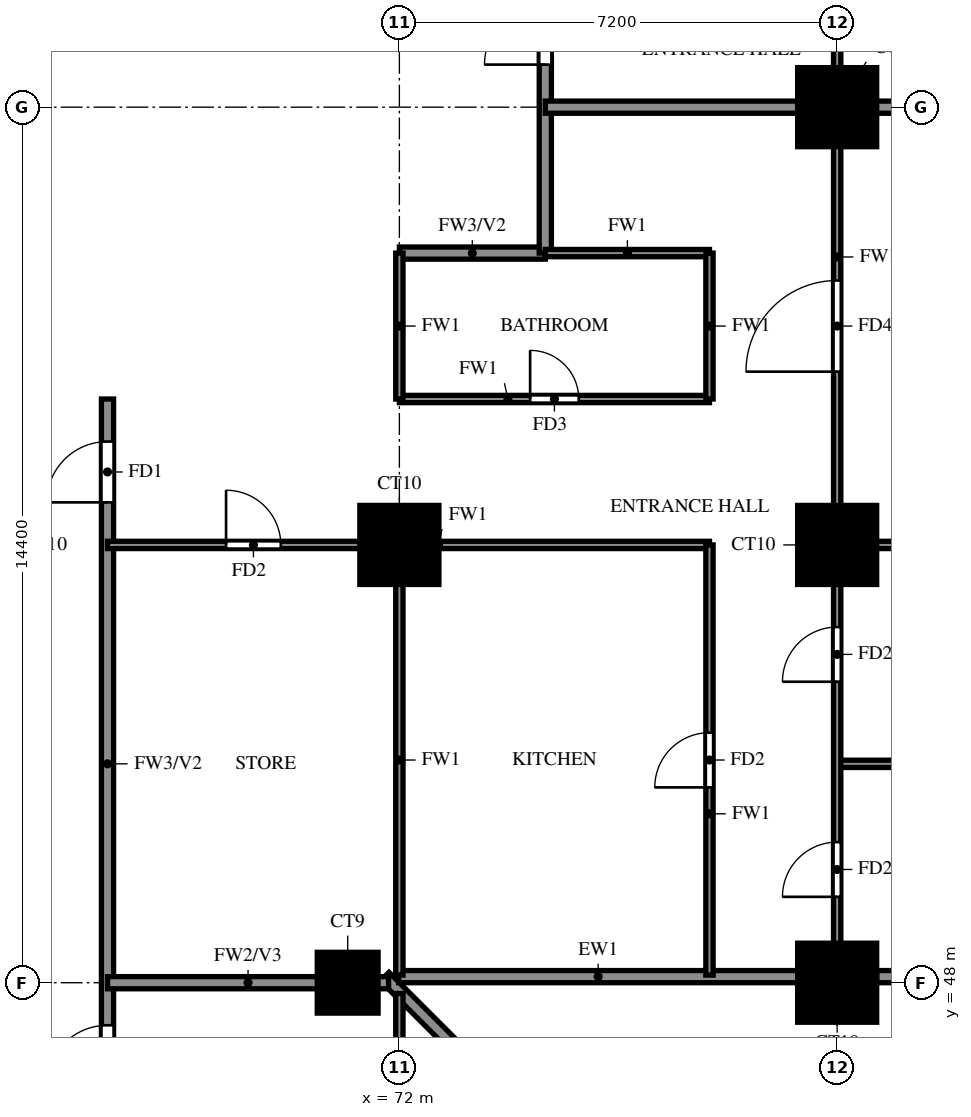
"""IFC4 building model, lengths in metres.
Left out: names, types, materials, properties, quantities, classifications, styles, units other than length and angle.
Written with IfcOpenShell. Run it as: python <this file> out.ifc"""

import sys

from ifc_helpers import new_model, si_unit, direction, frame, frame_2d, origin, origin_2d, place, context, subcontext, project, spatial, rectangle, extrude, source, transform, mapped, element, fill, save


model = new_model("IFC4")
c1 = context("Model", 3, precision=1e-05, world=origin(), true_north=direction((0.0, 1.0)))
c2 = subcontext(c1, "Body", "Model", "MODEL_VIEW")
j1 = project(units=[si_unit("LENGTHUNIT", "METRE"), si_unit("PLANEANGLEUNIT", "RADIAN")], contexts=[c1])
p1 = place(None, origin())
s1 = spatial("IfcSite", under=j1, at=p1, CompositionType="ELEMENT")
p2 = place(p1, origin())
s2 = spatial("IfcBuilding", under=s1, at=p2, CompositionType="ELEMENT")
p3 = place(p2, frame((0.0, 0.0, 62.0)))
s3 = spatial("IfcBuildingStorey", under=s2, at=p3, CompositionType="ELEMENT", Elevation=62.0)
m1 = source(origin(), c2, "Body", "SweptSolid", [
    extrude(rectangle(XDim=1.0, YDim=1.0, at=origin_2d()), origin(), (0.0, 0.0, 1.0), 3.18),
])
p4 = place(p3, frame((71.15, 48.0, 0.0), z_axis=(0.0, 0.0, 1.0), x_axis=(1.0, 0.0, 0.0)))
e1 = element("IfcColumn", 1, at=p4, inside=s3, PredefinedType="COLUMN", context=c2, shape_type="MappedRepresentation", body=[
    mapped(m1, transform((0.0, 0.0, 0.0))),
])
m2 = source(origin(), c2, "Body", "SweptSolid", [
    extrude(rectangle(XDim=1.3, YDim=1.3, at=origin_2d()), origin(), (0.0, 0.0, 1.0), 3.18),
])
for number, where, z_axis, x_axis in (
    (2, (79.2, 48.0, 0.0), (0.0, 0.0, 1.0), (1.0, 0.0, 0.0)),
    (3, (72.0, 55.2, 0.0), (0.0, 0.0, 1.0), (1.0, 0.0, 0.0)),
    (4, (79.2, 55.2, 0.0), (0.0, 0.0, 1.0), (1.0, 0.0, 0.0)),
    (5, (79.2, 62.4, 0.0), (0.0, 0.0, 1.0), (1.0, 0.0, 0.0)),
):
    element("IfcColumn", number, at=place(p3, frame(where, z_axis=z_axis, x_axis=x_axis)), inside=s3, PredefinedType="COLUMN", context=c2, shape_type="MappedRepresentation", body=[
        mapped(m2, transform((0.0, 0.0, 0.0))),
    ])
p5 = place(p3, frame((85.996, 33.863, 0.0), z_axis=(0.0, 0.0, 1.0), x_axis=(-0.707100718496, 0.707112843825, 0.0)))
e6 = element("IfcWall", 6, at=p5, inside=s3, PredefinedType="SOLIDWALL", context=c2, shape_type="SweptSolid", body=[
    extrude(rectangle(XDim=20.135, YDim=0.2, at=frame_2d((10.067, 0.0))), origin(), (0.0, 0.0, 1.0), 3.18),
])
p6 = place(p3, frame((71.989, 48.1, 0.0), z_axis=(0.0, 0.0, 1.0), x_axis=(1.0, 0.0, 0.0)))
e7 = element("IfcWall", 7, at=p6, inside=s3, PredefinedType="SOLIDWALL", context=c2, shape_type="SweptSolid", body=[
    extrude(rectangle(XDim=6.562, YDim=0.2, at=frame_2d((3.281, 0.0))), origin(), (0.0, 0.0, 1.0), 3.18),
])
p7 = place(p3, frame((79.85, 48.1, 0.0), z_axis=(0.0, 0.0, 1.0), x_axis=(1.0, 0.0, 0.0)))
e8 = element("IfcWall", 8, at=p7, inside=s3, PredefinedType="SOLIDWALL", context=c2, shape_type="SweptSolid", body=[
    extrude(rectangle(XDim=5.45, YDim=0.2, at=frame_2d((2.725, 0.0))), origin(), (0.0, 0.0, 1.0), 3.18),
])
p8 = place(p7, frame((1.525, 0.0, 0.6)))
e9 = element("IfcOpeningElement", 9, at=p8, cuts=e8, PredefinedType="OPENING", context=c2, shape_type="SweptSolid", body=[
    extrude(rectangle(XDim=2.4, YDim=2.4, at=frame_2d((1.2, 1.2))), frame((0.0, 0.11, 0.0), z_axis=(0.0, -1.0, 0.0), x_axis=(1.0, 0.0, 0.0)), (0.0, 0.0, 1.0), 0.22),
])
p9 = place(p3, frame((72.0, 60.0, 0.0), z_axis=(0.0, 0.0, 1.0), x_axis=(1.0, 0.0, 0.0)))
e10 = element("IfcWall", 10, at=p9, inside=s3, PredefinedType="SOLIDWALL", context=c2, shape_type="SweptSolid", body=[
    extrude(rectangle(XDim=2.4, YDim=0.2, at=frame_2d((1.2, 0.0))), origin(), (0.0, 0.0, 1.0), 3.18),
])
p10 = place(p3, frame((67.2, 45.6, 0.0), z_axis=(0.0, 0.0, 1.0), x_axis=(0.0, 1.0, 0.0)))
e11 = element("IfcWall", 11, at=p10, inside=s3, PredefinedType="SOLIDWALL", context=c2, shape_type="SweptSolid", body=[
    extrude(rectangle(XDim=12.0, YDim=0.2, at=frame_2d((6.0, 0.0))), origin(), (0.0, 0.0, 1.0), 3.18),
])
p11 = place(p10, frame((10.3, 0.0, 0.0)))
e12 = element("IfcOpeningElement", 12, at=p11, cuts=e11, PredefinedType="OPENING", context=c2, shape_type="SweptSolid", body=[
    extrude(rectangle(XDim=1.0, YDim=2.1, at=frame_2d((0.5, 1.05))), frame((0.0, 0.11, 0.0), z_axis=(0.0, -1.0, 0.0), x_axis=(1.0, 0.0, 0.0)), (0.0, 0.0, 1.0), 0.22),
])
p12 = place(p10, frame((0.7, 0.0, 0.0)))
e13 = element("IfcOpeningElement", 13, at=p12, cuts=e11, PredefinedType="OPENING", context=c2, shape_type="SweptSolid", body=[
    extrude(rectangle(XDim=1.0, YDim=2.1, at=frame_2d((0.5, 1.05))), frame((0.0, 0.11, 0.0), z_axis=(0.0, -1.0, 0.0), x_axis=(1.0, 0.0, 0.0)), (0.0, 0.0, 1.0), 0.22),
])
p13 = place(p3, frame((74.4, 60.0, 0.0), z_axis=(0.0, 0.0, 1.0), x_axis=(0.0, 1.0, 0.0)))
e14 = element("IfcWall", 14, at=p13, inside=s3, PredefinedType="SOLIDWALL", context=c2, shape_type="SweptSolid", body=[
    extrude(rectangle(XDim=9.6, YDim=0.2, at=frame_2d((4.8, 0.0))), origin(), (0.0, 0.0, 1.0), 3.18),
])
p14 = place(p13, frame((3.1, 0.0, 0.0)))
e15 = element("IfcOpeningElement", 15, at=p14, cuts=e14, PredefinedType="OPENING", context=c2, shape_type="SweptSolid", body=[
    extrude(rectangle(XDim=1.0, YDim=2.1, at=frame_2d((0.5, 1.05))), frame((0.0, 0.11, 0.0), z_axis=(0.0, -1.0, 0.0), x_axis=(1.0, 0.0, 0.0)), (0.0, 0.0, 1.0), 0.22),
])
p15 = place(p3, frame((67.2, 48.0, 0.0), z_axis=(0.0, 0.0, 1.0), x_axis=(1.0, 0.0, 0.0)))
e16 = element("IfcWall", 16, at=p15, inside=s3, PredefinedType="SOLIDWALL", context=c2, shape_type="SweptSolid", body=[
    extrude(rectangle(XDim=4.623, YDim=0.2, at=frame_2d((2.312, 0.0))), origin(), (0.0, 0.0, 1.0), 3.18),
])
p16 = place(p3, frame((74.4, 62.4, 0.0), z_axis=(0.0, 0.0, 1.0), x_axis=(1.0, 0.0, 0.0)))
e17 = element("IfcWall", 17, at=p16, inside=s3, PredefinedType="SOLIDWALL", context=c2, shape_type="SweptSolid", body=[
    extrude(rectangle(XDim=11.875, YDim=0.2, at=frame_2d((5.938, 0.0))), origin(), (0.0, 0.0, 1.0), 3.18),
])
p17 = place(p3, frame((79.2, 51.6, 0.0), z_axis=(0.0, 0.0, 1.0), x_axis=(1.0, 0.0, 0.0)))
e18 = element("IfcWall", 18, at=p17, inside=s3, PredefinedType="PARTITIONING", context=c2, shape_type="SweptSolid", body=[
    extrude(rectangle(XDim=7.075, YDim=0.12, at=frame_2d((3.538, 0.0))), origin(), (0.0, 0.0, 1.0), 2.28),
])
p18 = place(p3, frame((67.2, 55.2, 0.0), z_axis=(0.0, 0.0, 1.0), x_axis=(1.0, 0.0, 0.0)))
e19 = element("IfcWall", 19, at=p18, inside=s3, PredefinedType="PARTITIONING", context=c2, shape_type="SweptSolid", body=[
    extrude(rectangle(XDim=9.9, YDim=0.12, at=frame_2d((4.95, 0.0))), origin(), (0.0, 0.0, 1.0), 3.18),
])
p19 = place(p18, frame((1.95, 0.0, 0.0)))
e20 = element("IfcOpeningElement", 20, at=p19, cuts=e19, PredefinedType="OPENING", context=c2, shape_type="SweptSolid", body=[
    extrude(rectangle(XDim=0.9, YDim=2.1, at=frame_2d((0.45, 1.05))), frame((0.0, 0.07, 0.0), z_axis=(0.0, -1.0, 0.0), x_axis=(1.0, 0.0, 0.0)), (0.0, 0.0, 1.0), 0.14),
])
p20 = place(p3, frame((79.2, 55.2, 0.0), z_axis=(0.0, 0.0, 1.0), x_axis=(1.0, 0.0, 0.0)))
e21 = element("IfcWall", 21, at=p20, inside=s3, PredefinedType="PARTITIONING", context=c2, shape_type="SweptSolid", body=[
    extrude(rectangle(XDim=7.075, YDim=0.12, at=frame_2d((3.538, 0.0))), origin(), (0.0, 0.0, 1.0), 3.18),
])
p21 = place(p3, frame((72.0, 57.6, 0.0), z_axis=(0.0, 0.0, 1.0), x_axis=(1.0, 0.0, 0.0)))
e22 = element("IfcWall", 22, at=p21, inside=s3, PredefinedType="PARTITIONING", context=c2, shape_type="SweptSolid", body=[
    extrude(rectangle(XDim=5.1, YDim=0.12, at=frame_2d((2.55, 0.0))), origin(), (0.0, 0.0, 1.0), 3.18),
])
p22 = place(p21, frame((2.15, 0.0, 0.0)))
e23 = element("IfcOpeningElement", 23, at=p22, cuts=e22, PredefinedType="OPENING", context=c2, shape_type="SweptSolid", body=[
    extrude(rectangle(XDim=0.8, YDim=2.1, at=frame_2d((0.4, 1.05))), frame((0.0, 0.07, 0.0), z_axis=(0.0, -1.0, 0.0), x_axis=(1.0, 0.0, 0.0)), (0.0, 0.0, 1.0), 0.14),
])
p23 = place(p3, frame((74.4, 60.0, 0.0), z_axis=(0.0, 0.0, 1.0), x_axis=(1.0, 0.0, 0.0)))
e24 = element("IfcWall", 24, at=p23, inside=s3, PredefinedType="PARTITIONING", context=c2, shape_type="SweptSolid", body=[
    extrude(rectangle(XDim=2.7, YDim=0.12, at=frame_2d((1.35, 0.0))), origin(), (0.0, 0.0, 1.0), 3.18),
])
p24 = place(p3, frame((72.0, 33.725, 0.0), z_axis=(0.0, 0.0, 1.0), x_axis=(0.0, 1.0, 0.0)))
e25 = element("IfcWall", 25, at=p24, inside=s3, PredefinedType="PARTITIONING", context=c2, shape_type="SweptSolid", body=[
    extrude(rectangle(XDim=14.098, YDim=0.12, at=frame_2d((7.049, 0.0))), origin(), (0.0, 0.0, 1.0), 2.28),
])
p25 = place(p24, frame((10.075, 0.0, 0.0)))
e26 = element("IfcOpeningElement", 26, at=p25, cuts=e25, PredefinedType="OPENING", context=c2, shape_type="SweptSolid", body=[
    extrude(rectangle(XDim=0.9, YDim=2.1, at=frame_2d((0.45, 1.05))), frame((0.0, 0.07, 0.0), z_axis=(0.0, -1.0, 0.0), x_axis=(1.0, 0.0, 0.0)), (0.0, 0.0, 1.0), 0.14),
])
p26 = place(p3, frame((72.0, 48.125, 0.0), z_axis=(0.0, 0.0, 1.0), x_axis=(0.0, 1.0, 0.0)))
e27 = element("IfcWall", 27, at=p26, inside=s3, PredefinedType="PARTITIONING", context=c2, shape_type="SweptSolid", body=[
    extrude(rectangle(XDim=7.075, YDim=0.12, at=frame_2d((3.538, 0.0))), origin(), (0.0, 0.0, 1.0), 3.18),
])
p27 = place(p3, frame((72.0, 57.6, 0.0), z_axis=(0.0, 0.0, 1.0), x_axis=(0.0, 1.0, 0.0)))
e28 = element("IfcWall", 28, at=p27, inside=s3, PredefinedType="PARTITIONING", context=c2, shape_type="SweptSolid", body=[
    extrude(rectangle(XDim=2.4, YDim=0.12, at=frame_2d((1.2, 0.0))), origin(), (0.0, 0.0, 1.0), 3.18),
])
p28 = place(p3, frame((77.1, 48.125, 0.0), z_axis=(0.0, 0.0, 1.0), x_axis=(0.0, 1.0, 0.0)))
e29 = element("IfcWall", 29, at=p28, inside=s3, PredefinedType="PARTITIONING", context=c2, shape_type="SweptSolid", body=[
    extrude(rectangle(XDim=7.075, YDim=0.12, at=frame_2d((3.538, 0.0))), origin(), (0.0, 0.0, 1.0), 3.18),
])
p29 = place(p28, frame((3.087, 0.0, 0.0)))
e30 = element("IfcOpeningElement", 30, at=p29, cuts=e29, PredefinedType="OPENING", context=c2, shape_type="SweptSolid", body=[
    extrude(rectangle(XDim=0.9, YDim=2.1, at=frame_2d((0.45, 1.05))), frame((0.0, 0.07, 0.0), z_axis=(0.0, -1.0, 0.0), x_axis=(1.0, 0.0, 0.0)), (0.0, 0.0, 1.0), 0.14),
])
p30 = place(p3, frame((77.1, 57.6, 0.0), z_axis=(0.0, 0.0, 1.0), x_axis=(0.0, 1.0, 0.0)))
e31 = element("IfcWall", 31, at=p30, inside=s3, PredefinedType="PARTITIONING", context=c2, shape_type="SweptSolid", body=[
    extrude(rectangle(XDim=2.4, YDim=0.12, at=frame_2d((1.2, 0.0))), origin(), (0.0, 0.0, 1.0), 3.18),
])
p31 = place(p3, frame((79.2, 48.125, 0.0), z_axis=(0.0, 0.0, 1.0), x_axis=(0.0, 1.0, 0.0)))
e32 = element("IfcWall", 32, at=p31, inside=s3, PredefinedType="PARTITIONING", context=c2, shape_type="SweptSolid", body=[
    extrude(rectangle(XDim=21.475, YDim=0.12, at=frame_2d((10.738, 0.0))), origin(), (0.0, 0.0, 1.0), 3.18),
])
p32 = place(p31, frame((1.288, 0.0, 0.0)))
e33 = element("IfcOpeningElement", 33, at=p32, cuts=e32, PredefinedType="OPENING", context=c2, shape_type="SweptSolid", body=[
    extrude(rectangle(XDim=0.9, YDim=2.1, at=frame_2d((0.45, 1.05))), frame((0.0, 0.07, 0.0), z_axis=(0.0, -1.0, 0.0), x_axis=(1.0, 0.0, 0.0)), (0.0, 0.0, 1.0), 0.14),
])
p33 = place(p31, frame((4.825, 0.0, 0.0)))
e34 = element("IfcOpeningElement", 34, at=p33, cuts=e32, PredefinedType="OPENING", context=c2, shape_type="SweptSolid", body=[
    extrude(rectangle(XDim=0.9, YDim=2.1, at=frame_2d((0.45, 1.05))), frame((0.0, 0.07, 0.0), z_axis=(0.0, -1.0, 0.0), x_axis=(1.0, 0.0, 0.0)), (0.0, 0.0, 1.0), 0.14),
])
p34 = place(p31, frame((9.925, 0.0, 0.0)))
e35 = element("IfcOpeningElement", 35, at=p34, cuts=e32, PredefinedType="OPENING", context=c2, shape_type="SweptSolid", body=[
    extrude(rectangle(XDim=1.5, YDim=2.1, at=frame_2d((0.75, 1.05))), frame((0.0, 0.07, 0.0), z_axis=(0.0, -1.0, 0.0), x_axis=(1.0, 0.0, 0.0)), (0.0, 0.0, 1.0), 0.14),
])
p35 = place(p31, frame((15.625, 0.0, 0.0)))
e36 = element("IfcOpeningElement", 36, at=p35, cuts=e32, PredefinedType="OPENING", context=c2, shape_type="SweptSolid", body=[
    extrude(rectangle(XDim=0.9, YDim=2.1, at=frame_2d((0.45, 1.05))), frame((0.0, 0.07, 0.0), z_axis=(0.0, -1.0, 0.0), x_axis=(1.0, 0.0, 0.0)), (0.0, 0.0, 1.0), 0.14),
])
p36 = place(p31, frame((19.225, 0.0, 0.0)))
e37 = element("IfcOpeningElement", 37, at=p36, cuts=e32, PredefinedType="OPENING", context=c2, shape_type="SweptSolid", body=[
    extrude(rectangle(XDim=0.9, YDim=2.1, at=frame_2d((0.45, 1.05))), frame((0.0, 0.07, 0.0), z_axis=(0.0, -1.0, 0.0), x_axis=(1.0, 0.0, 0.0)), (0.0, 0.0, 1.0), 0.14),
])
p37 = place(p11, origin())
e38 = element("IfcDoor", 38, at=p37, inside=s3, OperationType="SINGLE_SWING_LEFT", PredefinedType="DOOR", context=c2, shape_type="SweptSolid", body=[
    extrude(rectangle(XDim=1.0, YDim=2.1, at=frame_2d((0.5, 1.05))), frame((0.0, 0.025, 0.0), z_axis=(0.0, -1.0, 0.0), x_axis=(1.0, 0.0, 0.0)), (0.0, 0.0, 1.0), 0.05),
])
fill(e12, e38)
p38 = place(p32, origin())
e39 = element("IfcDoor", 39, at=p38, inside=s3, OperationType="SINGLE_SWING_LEFT", PredefinedType="DOOR", context=c2, shape_type="SweptSolid", body=[
    extrude(rectangle(XDim=0.9, YDim=2.1, at=frame_2d((0.45, 1.05))), frame((0.0, 0.025, 0.0), z_axis=(0.0, -1.0, 0.0), x_axis=(1.0, 0.0, 0.0)), (0.0, 0.0, 1.0), 0.05),
])
fill(e33, e39)
p39 = place(p33, origin())
e40 = element("IfcDoor", 40, at=p39, inside=s3, OperationType="SINGLE_SWING_RIGHT", PredefinedType="DOOR", context=c2, shape_type="SweptSolid", body=[
    extrude(rectangle(XDim=0.9, YDim=2.1, at=frame_2d((0.45, 1.05))), frame((0.0, 0.025, 0.0), z_axis=(0.0, -1.0, 0.0), x_axis=(1.0, 0.0, 0.0)), (0.0, 0.0, 1.0), 0.05),
])
fill(e34, e40)
p40 = place(p34, origin())
e41 = element("IfcDoor", 41, at=p40, inside=s3, OperationType="SINGLE_SWING_LEFT", PredefinedType="DOOR", context=c2, shape_type="SweptSolid", body=[
    extrude(rectangle(XDim=1.5, YDim=2.1, at=frame_2d((0.75, 1.05))), frame((0.0, 0.025, 0.0), z_axis=(0.0, -1.0, 0.0), x_axis=(1.0, 0.0, 0.0)), (0.0, 0.0, 1.0), 0.05),
])
fill(e35, e41)
p41 = place(p29, origin())
e42 = element("IfcDoor", 42, at=p41, inside=s3, OperationType="SINGLE_SWING_LEFT", PredefinedType="DOOR", context=c2, shape_type="SweptSolid", body=[
    extrude(rectangle(XDim=0.9, YDim=2.1, at=frame_2d((0.45, 1.05))), frame((0.0, 0.025, 0.0), z_axis=(0.0, -1.0, 0.0), x_axis=(1.0, 0.0, 0.0)), (0.0, 0.0, 1.0), 0.05),
])
fill(e30, e42)
p42 = place(p22, origin())
e43 = element("IfcDoor", 43, at=p42, inside=s3, OperationType="SINGLE_SWING_RIGHT", PredefinedType="DOOR", context=c2, shape_type="SweptSolid", body=[
    extrude(rectangle(XDim=0.8, YDim=2.1, at=frame_2d((0.4, 1.05))), frame((0.0, 0.025, 0.0), z_axis=(0.0, -1.0, 0.0), x_axis=(1.0, 0.0, 0.0)), (0.0, 0.0, 1.0), 0.05),
])
fill(e23, e43)
p43 = place(p19, origin())
e44 = element("IfcDoor", 44, at=p43, inside=s3, OperationType="SINGLE_SWING_LEFT", PredefinedType="DOOR", context=c2, shape_type="SweptSolid", body=[
    extrude(rectangle(XDim=0.9, YDim=2.1, at=frame_2d((0.45, 1.05))), frame((0.0, 0.025, 0.0), z_axis=(0.0, -1.0, 0.0), x_axis=(1.0, 0.0, 0.0)), (0.0, 0.0, 1.0), 0.05),
])
fill(e20, e44)
p44 = place(p14, origin())
e45 = element("IfcDoor", 45, at=p44, inside=s3, OperationType="SINGLE_SWING_RIGHT", PredefinedType="DOOR", context=c2, shape_type="SweptSolid", body=[
    extrude(rectangle(XDim=1.0, YDim=2.1, at=frame_2d((0.5, 1.05))), frame((0.0, 0.025, 0.0), z_axis=(0.0, -1.0, 0.0), x_axis=(1.0, 0.0, 0.0)), (0.0, 0.0, 1.0), 0.05),
])
fill(e15, e45)
p45 = place(p12, origin())
e46 = element("IfcDoor", 46, at=p45, inside=s3, OperationType="SINGLE_SWING_LEFT", PredefinedType="DOOR", context=c2, shape_type="SweptSolid", body=[
    extrude(rectangle(XDim=1.0, YDim=2.1, at=frame_2d((0.5, 1.05))), frame((0.0, 0.025, 0.0), z_axis=(0.0, -1.0, 0.0), x_axis=(1.0, 0.0, 0.0)), (0.0, 0.0, 1.0), 0.05),
])
fill(e13, e46)
save(model, sys.argv[1])
